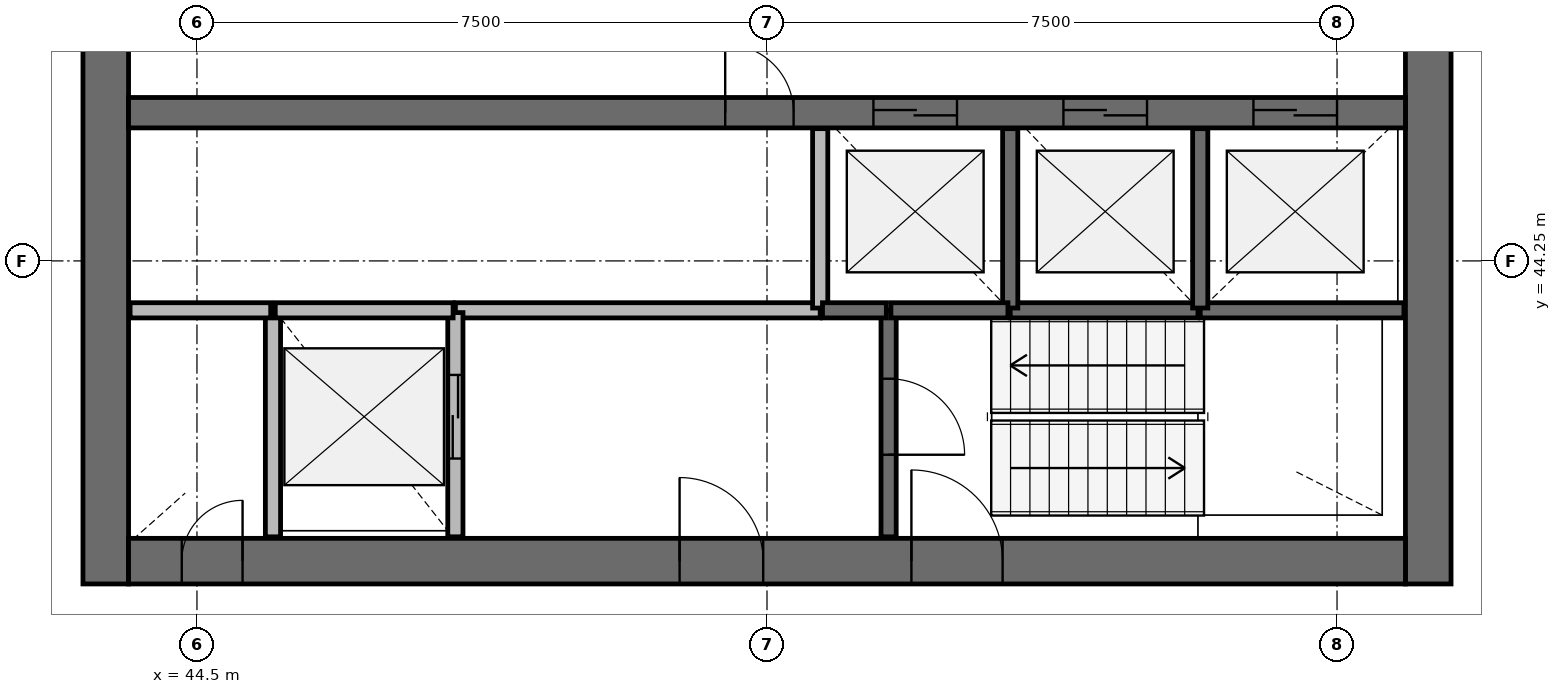
"""IFC4 building model, lengths in metres.
Left out: names, types, materials, properties, quantities, classifications, styles, units other than length and angle.
Written with IfcOpenShell. Run it as: python <this file> out.ifc"""

import sys

from ifc_helpers import new_model, si_unit, direction, frame, frame_2d, origin, place, context, subcontext, project, spatial, rectangle, extrude, source, transform, mapped, element, fill, save


model = new_model("IFC4")
c1 = context("Model", 3, precision=1e-05, world=origin(), true_north=direction((0.0, 1.0)))
c2 = subcontext(c1, "Body", "Model", "MODEL_VIEW")
j1 = project(units=[si_unit("LENGTHUNIT", "METRE"), si_unit("PLANEANGLEUNIT", "RADIAN")], contexts=[c1])
p1 = place(None, origin())
s1 = spatial("IfcSite", under=j1, at=p1, CompositionType="ELEMENT")
p2 = place(p1, origin())
s2 = spatial("IfcBuilding", under=s1, at=p2, CompositionType="ELEMENT")
p3 = place(p2, frame((0.0, 0.0, 234.5)))
s3 = spatial("IfcBuildingStorey", under=s2, at=p3, CompositionType="ELEMENT", Elevation=234.5)
p4 = place(p3, frame((60.7, 40.0, 0.0), z_axis=(0.0, 0.0, 1.0), x_axis=(0.0, 1.0, 0.0)))
e1 = element("IfcWall", 1, at=p4, inside=s3, PredefinedType="SHEAR", context=c2, shape_type="SweptSolid", body=[
    extrude(rectangle(XDim=16.0, YDim=0.6, at=frame_2d((8.0, 0.0))), origin(), (0.0, 0.0, 1.0), 3.9),
])
p5 = place(p4, frame((7.1, 0.0, 0.0)))
e2 = element("IfcOpeningElement", 2, at=p5, cuts=e1, PredefinedType="OPENING", context=c2, shape_type="SweptSolid", body=[
    extrude(rectangle(XDim=1.8, YDim=2.1, at=frame_2d((0.9, 1.05))), frame((0.0, 0.31, 0.0), z_axis=(0.0, -1.0, 0.0), x_axis=(1.0, 0.0, 0.0)), (0.0, 0.0, 1.0), 0.62),
])
p6 = place(p3, frame((43.3, 56.0, 0.0), z_axis=(0.0, 0.0, 1.0), x_axis=(0.0, -1.0, 0.0)))
e3 = element("IfcWall", 3, at=p6, inside=s3, PredefinedType="SHEAR", context=c2, shape_type="SweptSolid", body=[
    extrude(rectangle(XDim=16.0, YDim=0.6, at=frame_2d((8.0, 0.0))), origin(), (0.0, 0.0, 1.0), 3.9),
])
p7 = place(p6, frame((7.1, 0.0, 0.0)))
e4 = element("IfcOpeningElement", 4, at=p7, cuts=e3, PredefinedType="OPENING", context=c2, shape_type="SweptSolid", body=[
    extrude(rectangle(XDim=1.8, YDim=2.1, at=frame_2d((0.9, 1.05))), frame((0.0, 0.31, 0.0), z_axis=(0.0, -1.0, 0.0), x_axis=(1.0, 0.0, 0.0)), (0.0, 0.0, 1.0), 0.62),
])
p8 = place(p3, frame((43.6, 40.3, 0.0), z_axis=(0.0, 0.0, 1.0), x_axis=(1.0, 0.0, 0.0)))
e5 = element("IfcWall", 5, at=p8, inside=s3, PredefinedType="SHEAR", context=c2, shape_type="SweptSolid", body=[
    extrude(rectangle(XDim=16.8, YDim=0.6, at=frame_2d((8.4, 0.0))), origin(), (0.0, 0.0, 1.0), 3.9),
])
p9 = place(p8, frame((10.3, 0.0, 0.0)))
e6 = element("IfcOpeningElement", 6, at=p9, cuts=e5, PredefinedType="OPENING", context=c2, shape_type="SweptSolid", body=[
    extrude(rectangle(XDim=1.2, YDim=2.1, at=frame_2d((0.6, 1.05))), frame((0.0, 0.31, 0.0), z_axis=(0.0, -1.0, 0.0), x_axis=(1.0, 0.0, 0.0)), (0.0, 0.0, 1.0), 0.62),
])
p10 = place(p8, frame((7.25, 0.0, 0.0)))
e7 = element("IfcOpeningElement", 7, at=p10, cuts=e5, PredefinedType="OPENING", context=c2, shape_type="SweptSolid", body=[
    extrude(rectangle(XDim=1.1, YDim=2.1, at=frame_2d((0.55, 1.05))), frame((0.0, 0.31, 0.0), z_axis=(0.0, -1.0, 0.0), x_axis=(1.0, 0.0, 0.0)), (0.0, 0.0, 1.0), 0.62),
])
p11 = place(p8, frame((0.7, 0.0, 0.0)))
e8 = element("IfcOpeningElement", 8, at=p11, cuts=e5, PredefinedType="OPENING", context=c2, shape_type="SweptSolid", body=[
    extrude(rectangle(XDim=0.8, YDim=2.1, at=frame_2d((0.4, 1.05))), frame((0.0, 0.31, 0.0), z_axis=(0.0, -1.0, 0.0), x_axis=(1.0, 0.0, 0.0)), (0.0, 0.0, 1.0), 0.62),
])
p12 = place(p3, frame((43.6, 46.2, 0.0), z_axis=(0.0, 0.0, 1.0), x_axis=(1.0, 0.0, 0.0)))
e9 = element("IfcWall", 9, at=p12, inside=s3, PredefinedType="SHEAR", context=c2, shape_type="SweptSolid", body=[
    extrude(rectangle(XDim=16.8, YDim=0.4, at=frame_2d((8.4, 0.0))), origin(), (0.0, 0.0, 1.0), 3.9),
])
p13 = place(p12, frame((9.8, 0.0, 0.0)))
e10 = element("IfcOpeningElement", 10, at=p13, cuts=e9, PredefinedType="OPENING", context=c2, shape_type="SweptSolid", body=[
    extrude(rectangle(XDim=1.1, YDim=2.1, at=frame_2d((0.55, 1.05))), frame((0.0, 0.21, 0.0), z_axis=(0.0, -1.0, 0.0), x_axis=(1.0, 0.0, 0.0)), (0.0, 0.0, 1.0), 0.42),
])
p14 = place(p12, frame((12.3, 0.0, 0.0)))
e11 = element("IfcOpeningElement", 11, at=p14, cuts=e9, PredefinedType="OPENING", context=c2, shape_type="SweptSolid", body=[
    extrude(rectangle(XDim=1.1, YDim=2.1, at=frame_2d((0.55, 1.05))), frame((0.0, 0.21, 0.0), z_axis=(0.0, -1.0, 0.0), x_axis=(1.0, 0.0, 0.0)), (0.0, 0.0, 1.0), 0.42),
])
p15 = place(p12, frame((14.8, 0.0, 0.0)))
e12 = element("IfcOpeningElement", 12, at=p15, cuts=e9, PredefinedType="OPENING", context=c2, shape_type="SweptSolid", body=[
    extrude(rectangle(XDim=1.1, YDim=2.1, at=frame_2d((0.55, 1.05))), frame((0.0, 0.21, 0.0), z_axis=(0.0, -1.0, 0.0), x_axis=(1.0, 0.0, 0.0)), (0.0, 0.0, 1.0), 0.42),
])
p16 = place(p12, frame((7.85, 0.0, 0.0)))
e13 = element("IfcOpeningElement", 13, at=p16, cuts=e9, PredefinedType="OPENING", context=c2, shape_type="SweptSolid", body=[
    extrude(rectangle(XDim=0.9, YDim=2.1, at=frame_2d((0.45, 1.05))), frame((0.0, 0.21, 0.0), z_axis=(0.0, -1.0, 0.0), x_axis=(1.0, 0.0, 0.0)), (0.0, 0.0, 1.0), 0.42),
])
p17 = place(p3, frame((52.7, 43.6, 0.0), z_axis=(0.0, 0.0, 1.0), x_axis=(-1.0, 0.0, 0.0)))
e14 = element("IfcWall", 14, at=p17, inside=s3, PredefinedType="SOLIDWALL", context=c2, shape_type="SweptSolid", body=[
    extrude(rectangle(XDim=4.8, YDim=0.2, at=frame_2d((2.4, 0.0))), origin(), (0.0, 0.0, 1.0), 3.58),
])
p18 = place(p3, frame((45.5, 43.6, 0.0), z_axis=(0.0, 0.0, 1.0), x_axis=(0.0, -1.0, 0.0)))
e15 = element("IfcWall", 15, at=p18, inside=s3, PredefinedType="SOLIDWALL", context=c2, shape_type="SweptSolid", body=[
    extrude(rectangle(XDim=2.98, YDim=0.2, at=frame_2d((1.49, 0.0))), origin(), (0.0, 0.0, 1.0), 3.58),
])
p19 = place(p3, frame((47.9, 40.62, 0.0), z_axis=(0.0, 0.0, 1.0), x_axis=(0.0, 1.0, 0.0)))
e16 = element("IfcWall", 16, at=p19, inside=s3, PredefinedType="SOLIDWALL", context=c2, shape_type="SweptSolid", body=[
    extrude(rectangle(XDim=2.95, YDim=0.2, at=frame_2d((1.475, 0.0))), origin(), (0.0, 0.0, 1.0), 3.58),
])
p20 = place(p19, frame((1.03, 0.0, 0.0)))
e17 = element("IfcOpeningElement", 17, at=p20, cuts=e16, PredefinedType="OPENING", context=c2, shape_type="SweptSolid", body=[
    extrude(rectangle(XDim=1.1, YDim=2.1, at=frame_2d((0.55, 1.05))), frame((0.0, 0.11, 0.0), z_axis=(0.0, -1.0, 0.0), x_axis=(1.0, 0.0, 0.0)), (0.0, 0.0, 1.0), 0.22),
])
p21 = place(p3, frame((53.6, 43.6, 0.0), z_axis=(0.0, 0.0, 1.0), x_axis=(0.0, -1.0, 0.0)))
e18 = element("IfcWall", 18, at=p21, inside=s3, PredefinedType="SOLIDWALL", context=c2, shape_type="SweptSolid", body=[
    extrude(rectangle(XDim=2.98, YDim=0.2, at=frame_2d((1.49, 0.0))), origin(), (0.0, 0.0, 1.0), 3.58),
])
p22 = place(p21, frame((0.9, 0.0, 0.0)))
e19 = element("IfcOpeningElement", 19, at=p22, cuts=e18, PredefinedType="OPENING", context=c2, shape_type="SweptSolid", body=[
    extrude(rectangle(XDim=1.0, YDim=2.1, at=frame_2d((0.5, 1.05))), frame((0.0, 0.11, 0.0), z_axis=(0.0, -1.0, 0.0), x_axis=(1.0, 0.0, 0.0)), (0.0, 0.0, 1.0), 0.22),
])
p23 = place(p3, frame((57.7, 43.6, 0.0), z_axis=(0.0, 0.0, 1.0), x_axis=(1.0, 0.0, 0.0)))
e20 = element("IfcWall", 20, at=p23, inside=s3, PredefinedType="SOLIDWALL", context=c2, shape_type="SweptSolid", body=[
    extrude(rectangle(XDim=2.68, YDim=0.2, at=frame_2d((1.34, 0.0))), origin(), (0.0, 0.0, 1.0), 3.58),
])
p24 = place(p3, frame((55.2, 43.6, 0.0), z_axis=(0.0, 0.0, 1.0), x_axis=(1.0, 0.0, 0.0)))
e21 = element("IfcWall", 21, at=p24, inside=s3, PredefinedType="SOLIDWALL", context=c2, shape_type="SweptSolid", body=[
    extrude(rectangle(XDim=2.47, YDim=0.2, at=frame_2d((1.235, 0.0))), origin(), (0.0, 0.0, 1.0), 3.58),
])
p25 = place(p3, frame((47.87, 43.6, 0.0), z_axis=(0.0, 0.0, 1.0), x_axis=(-1.0, 0.0, 0.0)))
e22 = element("IfcWall", 22, at=p25, inside=s3, PredefinedType="SOLIDWALL", context=c2, shape_type="SweptSolid", body=[
    extrude(rectangle(XDim=2.34, YDim=0.2, at=frame_2d((1.17, 0.0))), origin(), (0.0, 0.0, 1.0), 3.58),
])
for number, where, z_axis, x_axis in (
    (23, (52.7, 45.99, 0.0), (0.0, 0.0, 1.0), (0.0, -1.0, 0.0)),
    (24, (55.2, 43.63, 0.0), (0.0, 0.0, 1.0), (0.0, 1.0, 0.0)),
    (25, (57.7, 43.63, 0.0), (0.0, 0.0, 1.0), (0.0, 1.0, 0.0)),
):
    element("IfcWall", number, at=place(p3, frame(where, z_axis=z_axis, x_axis=x_axis)), inside=s3, PredefinedType="SOLIDWALL", context=c2, shape_type="SweptSolid", body=[
        extrude(rectangle(XDim=2.36, YDim=0.2, at=frame_2d((1.18, 0.0))), origin(), (0.0, 0.0, 1.0), 3.58),
    ])
p26 = place(p3, frame((45.47, 43.6, 0.0), z_axis=(0.0, 0.0, 1.0), x_axis=(-1.0, 0.0, 0.0)))
e26 = element("IfcWall", 26, at=p26, inside=s3, PredefinedType="SOLIDWALL", context=c2, shape_type="SweptSolid", body=[
    extrude(rectangle(XDim=1.85, YDim=0.2, at=frame_2d((0.925, 0.0))), origin(), (0.0, 0.0, 1.0), 3.58),
])
p27 = place(p3, frame((53.63, 43.6, 0.0), z_axis=(0.0, 0.0, 1.0), x_axis=(1.0, 0.0, 0.0)))
e27 = element("IfcWall", 27, at=p27, inside=s3, PredefinedType="SOLIDWALL", context=c2, shape_type="SweptSolid", body=[
    extrude(rectangle(XDim=1.54, YDim=0.2, at=frame_2d((0.77, 0.0))), origin(), (0.0, 0.0, 1.0), 3.58),
])
p28 = place(p3, frame((52.73, 43.6, 0.0), z_axis=(0.0, 0.0, 1.0), x_axis=(1.0, 0.0, 0.0)))
e28 = element("IfcWall", 28, at=p28, inside=s3, PredefinedType="SOLIDWALL", context=c2, shape_type="SweptSolid", body=[
    extrude(rectangle(XDim=0.84, YDim=0.2, at=frame_2d((0.42, 0.0))), origin(), (0.0, 0.0, 1.0), 3.58),
])
m1 = source(origin(), c2, "Body", "SweptSolid", [
    extrude(rectangle(XDim=1.1, YDim=2.1, at=frame_2d((0.55, 1.05))), frame((0.0, 0.025, 0.0), z_axis=(0.0, -1.0, 0.0), x_axis=(1.0, 0.0, 0.0)), (0.0, 0.0, 1.0), 0.05),
])
p29 = place(p13, origin())
e29 = element("IfcDoor", 29, at=p29, inside=s3, OperationType="DOUBLE_DOOR_SLIDING", PredefinedType="USERDEFINED", context=c2, shape_type="MappedRepresentation", body=[
    mapped(m1, transform((0.0, 0.0, 0.0), scale=1.0)),
])
fill(e10, e29)
p30 = place(p14, origin())
e30 = element("IfcDoor", 30, at=p30, inside=s3, OperationType="DOUBLE_DOOR_SLIDING", PredefinedType="USERDEFINED", context=c2, shape_type="MappedRepresentation", body=[
    mapped(m1, transform((0.0, 0.0, 0.0), scale=1.0)),
])
fill(e11, e30)
p31 = place(p15, origin())
e31 = element("IfcDoor", 31, at=p31, inside=s3, OperationType="DOUBLE_DOOR_SLIDING", PredefinedType="USERDEFINED", context=c2, shape_type="MappedRepresentation", body=[
    mapped(m1, transform((0.0, 0.0, 0.0), scale=1.0)),
])
fill(e12, e31)
p32 = place(p20, origin())
e32 = element("IfcDoor", 32, at=p32, inside=s3, OperationType="DOUBLE_DOOR_SLIDING", PredefinedType="USERDEFINED", context=c2, shape_type="MappedRepresentation", body=[
    mapped(m1, transform((0.0, 0.0, 0.0), scale=1.0)),
])
fill(e17, e32)
m2 = source(origin(), c2, "Body", "SweptSolid", [
    extrude(rectangle(XDim=1.2, YDim=2.1, at=frame_2d((0.6, 1.05))), frame((0.0, 0.025, 0.0), z_axis=(0.0, -1.0, 0.0), x_axis=(1.0, 0.0, 0.0)), (0.0, 0.0, 1.0), 0.05),
])
p33 = place(p9, origin())
e33 = element("IfcDoor", 33, at=p33, inside=s3, OperationType="SINGLE_SWING_LEFT", PredefinedType="DOOR", context=c2, shape_type="MappedRepresentation", body=[
    mapped(m2, transform((0.0, 0.0, 0.0), scale=1.0)),
])
fill(e6, e33)
m3 = source(origin(), c2, "Body", "SweptSolid", [
    extrude(rectangle(XDim=1.0, YDim=2.1, at=frame_2d((0.5, 1.05))), frame((0.0, 0.025, 0.0), z_axis=(0.0, -1.0, 0.0), x_axis=(1.0, 0.0, 0.0)), (0.0, 0.0, 1.0), 0.05),
])
p34 = place(p22, origin())
e34 = element("IfcDoor", 34, at=p34, inside=s3, OperationType="SINGLE_SWING_RIGHT", PredefinedType="DOOR", context=c2, shape_type="MappedRepresentation", body=[
    mapped(m3, transform((0.0, 0.0, 0.0), scale=1.0)),
])
fill(e19, e34)
m4 = source(origin(), c2, "Body", "SweptSolid", [
    extrude(rectangle(XDim=1.1, YDim=2.1, at=frame_2d((0.55, 1.05))), frame((0.0, 0.025, 0.0), z_axis=(0.0, -1.0, 0.0), x_axis=(1.0, 0.0, 0.0)), (0.0, 0.0, 1.0), 0.05),
])
p35 = place(p10, origin())
e35 = element("IfcDoor", 35, at=p35, inside=s3, OperationType="SINGLE_SWING_LEFT", PredefinedType="DOOR", context=c2, shape_type="MappedRepresentation", body=[
    mapped(m4, transform((0.0, 0.0, 0.0), scale=1.0)),
])
fill(e7, e35)
m5 = source(origin(), c2, "Body", "SweptSolid", [
    extrude(rectangle(XDim=0.8, YDim=2.1, at=frame_2d((0.4, 1.05))), frame((0.0, 0.025, 0.0), z_axis=(0.0, -1.0, 0.0), x_axis=(1.0, 0.0, 0.0)), (0.0, 0.0, 1.0), 0.05),
])
p36 = place(p11, origin())
e36 = element("IfcDoor", 36, at=p36, inside=s3, OperationType="SINGLE_SWING_RIGHT", PredefinedType="DOOR", context=c2, shape_type="MappedRepresentation", body=[
    mapped(m5, transform((0.0, 0.0, 0.0), scale=1.0)),
])
fill(e8, e36)
m6 = source(origin(), c2, "Body", "SweptSolid", [
    extrude(rectangle(XDim=0.9, YDim=2.1, at=frame_2d((0.45, 1.05))), frame((0.0, 0.025, 0.0), z_axis=(0.0, -1.0, 0.0), x_axis=(1.0, 0.0, 0.0)), (0.0, 0.0, 1.0), 0.05),
])
p37 = place(p16, origin())
e37 = element("IfcDoor", 37, at=p37, inside=s3, OperationType="SINGLE_SWING_LEFT", PredefinedType="DOOR", context=c2, shape_type="MappedRepresentation", body=[
    mapped(m6, transform((0.0, 0.0, 0.0), scale=1.0)),
])
fill(e13, e37)
save(model, sys.argv[1])
